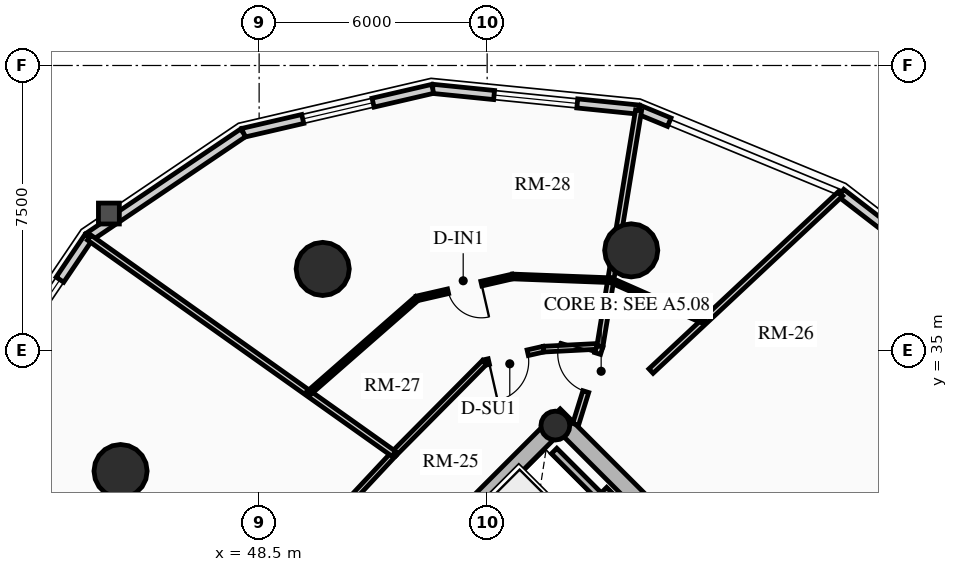
"""IFC4 building model, lengths in metres.
Left out: names, types, materials, properties, quantities, classifications, styles, units other than length and angle.
Written with IfcOpenShell. Run it as: python <this file> out.ifc"""

import sys

from ifc_helpers import new_model, si_unit, direction, frame, frame_2d, origin, origin_2d, place, context, subcontext, project, spatial, rectangle, circle, hollow_circle, extrude, source, transform, mapped, element, fill, save


model = new_model("IFC4")
c1 = context("Model", 3, precision=1e-05, world=origin(), true_north=direction((0.0, 1.0)))
c2 = subcontext(c1, "Body", "Model", "MODEL_VIEW")
j1 = project(units=[si_unit("LENGTHUNIT", "METRE"), si_unit("PLANEANGLEUNIT", "RADIAN")], contexts=[c1])
p1 = place(None, origin())
s1 = spatial("IfcSite", under=j1, at=p1, CompositionType="ELEMENT")
p2 = place(p1, origin())
s2 = spatial("IfcBuilding", under=s1, at=p2, CompositionType="ELEMENT")
p3 = place(p2, frame((0.0, 0.0, 107.98)))
s3 = spatial("IfcBuildingStorey", under=s2, at=p3, CompositionType="ELEMENT", Elevation=107.98)
p4 = place(p3, frame((66.303, 23.263, 0.0), z_axis=(0.0, 0.0, 1.0), x_axis=(-0.707106781187, 0.707106781187, 0.0)))
e1 = element("IfcWall", 1, at=p4, inside=s3, PredefinedType="SHEAR", context=c2, shape_type="SweptSolid", body=[
    extrude(rectangle(XDim=14.2, YDim=0.45, at=frame_2d((7.1, 0.0))), origin(), (0.0, 0.0, 1.0), 2.91),
])
p5 = place(p3, frame((48.856, 25.578, 0.0), z_axis=(0.0, 0.0, 1.0), x_axis=(0.707106781187, 0.707106781187, 0.0)))
e2 = element("IfcWall", 2, at=p5, inside=s3, PredefinedType="SHEAR", context=c2, shape_type="SweptSolid", body=[
    extrude(rectangle(XDim=10.7, YDim=0.45, at=frame_2d((5.35, 0.0))), origin(), (0.0, 0.0, 1.0), 2.91),
])
m1 = source(origin(), c2, "Body", "SweptSolid", [
    extrude(rectangle(XDim=1.5, YDim=2.02, at=frame_2d((0.75, 1.01))), frame((0.0, 0.235, 0.0), z_axis=(0.0, -1.0, 0.0), x_axis=(1.0, 0.0, 0.0)), (0.0, 0.0, 1.0), 0.47),
])
p6 = place(p5, frame((4.6, 0.0, 0.0)))
e3 = element("IfcOpeningElement", 3, at=p6, cuts=e2, PredefinedType="OPENING", context=c2, shape_type="MappedRepresentation", body=[
    mapped(m1, transform((0.0, 0.0, 0.0), x_axis=(1.0, 0.0, 0.0), y_axis=(0.0, 1.0, 0.0), z_axis=(0.0, 0.0, 1.0), scale=1.0)),
])
p7 = place(p3, frame((56.294, 33.024, 0.0), z_axis=(0.0, 0.0, 1.0), x_axis=(0.707106781187, 0.707106781187, 0.0)))
e4 = element("IfcColumn", 4, at=p7, inside=s3, PredefinedType="COLUMN", context=c2, shape_type="SweptSolid", body=[
    extrude(hollow_circle(Radius=0.38, WallThickness=0.032, at=origin_2d()), origin(), (0.0, 0.0, 1.0), 2.91),
])
for number, where, z_axis, x_axis in (
    (5, (58.291, 37.635, 0.0), (0.0, 0.0, 1.0), (1.0, 0.0, 0.0)),
    (6, (50.173, 37.146, 0.0), (0.0, 0.0, 1.0), (1.0, 0.0, 0.0)),
    (7, (44.854, 31.827, 0.0), (0.0, 0.0, 1.0), (1.0, 0.0, 0.0)),
):
    element("IfcColumn", number, at=place(p3, frame(where, z_axis=z_axis, x_axis=x_axis)), inside=s3, PredefinedType="USERDEFINED", context=c2, shape_type="SweptSolid", body=[
        extrude(circle(Radius=0.7, at=origin_2d()), origin(), (0.0, 0.0, 1.0), 2.91),
    ])
p8 = place(p3, frame((63.811, 39.145, 0.0), z_axis=(0.0, 0.0, 1.0), x_axis=(0.791982052206, -0.61054437102, 0.0)))
e8 = element("IfcWall", 8, at=p8, inside=s3, PredefinedType="SOLIDWALL", context=c2, shape_type="SweptSolid", body=[
    extrude(rectangle(XDim=5.942, YDim=0.24, at=frame_2d((2.971, 0.0))), origin(), (0.0, 0.0, 1.0), 2.179),
])
p9 = place(p3, frame((58.487, 41.339, 0.0), z_axis=(0.0, 0.0, 1.0), x_axis=(0.924556017656, -0.381046152345, 0.0)))
e9 = element("IfcWall", 9, at=p9, inside=s3, PredefinedType="SOLIDWALL", context=c2, shape_type="SweptSolid", body=[
    extrude(rectangle(XDim=0.87, YDim=0.24, at=frame_2d((0.435, 0.0))), origin(), (0.0, 0.0, 1.0), 2.179),
])
p10 = place(p3, frame((53.067, 41.885, 0.0), z_axis=(0.0, 0.0, 1.0), x_axis=(0.994971754311, -0.10015591906, 0.0)))
e10 = element("IfcWall", 10, at=p10, inside=s3, PredefinedType="SOLIDWALL", context=c2, shape_type="SweptSolid", body=[
    extrude(rectangle(XDim=5.448, YDim=0.24, at=frame_2d((2.724, 0.0))), origin(), (0.0, 0.0, 1.0), 2.179),
])
m2 = source(origin(), c2, "Body", "SweptSolid", [
    extrude(rectangle(XDim=2.2, YDim=1.35, at=frame_2d((1.1, 0.675))), frame((0.0, 0.13, 0.0), z_axis=(0.0, -1.0, 0.0), x_axis=(1.0, 0.0, 0.0)), (0.0, 0.0, 1.0), 0.26),
])
p11 = place(p10, frame((1.624, 0.0, 0.65)))
e11 = element("IfcOpeningElement", 11, at=p11, cuts=e10, PredefinedType="OPENING", context=c2, shape_type="MappedRepresentation", body=[
    mapped(m2, transform((0.0, 0.0, 0.0), x_axis=(1.0, 0.0, 0.0), y_axis=(0.0, 1.0, 0.0), z_axis=(0.0, 0.0, 1.0), scale=1.0)),
])
p12 = place(p3, frame((48.08, 40.729, 0.0), z_axis=(0.0, 0.0, 1.0), x_axis=(0.974165631126, 0.225834725257, 0.0)))
e12 = element("IfcWall", 12, at=p12, inside=s3, PredefinedType="SOLIDWALL", context=c2, shape_type="SweptSolid", body=[
    extrude(rectangle(XDim=5.119, YDim=0.24, at=frame_2d((2.56, 0.0))), origin(), (0.0, 0.0, 1.0), 2.179),
])
m3 = source(origin(), c2, "Body", "SweptSolid", [
    extrude(rectangle(XDim=1.9, YDim=1.35, at=frame_2d((0.95, 0.675))), frame((0.0, 0.13, 0.0), z_axis=(0.0, -1.0, 0.0), x_axis=(1.0, 0.0, 0.0)), (0.0, 0.0, 1.0), 0.26),
])
p13 = place(p12, frame((1.609, 0.0, 0.65)))
e13 = element("IfcOpeningElement", 13, at=p13, cuts=e12, PredefinedType="OPENING", context=c2, shape_type="MappedRepresentation", body=[
    mapped(m3, transform((0.0, 0.0, 0.0), x_axis=(1.0, 0.0, 0.0), y_axis=(0.0, 1.0, 0.0), z_axis=(0.0, 0.0, 1.0), scale=1.0)),
])
p14 = place(p3, frame((44.015, 37.985, 0.0), z_axis=(0.0, 0.0, 1.0), x_axis=(0.828781148131, 0.559572880421, 0.0)))
e14 = element("IfcWall", 14, at=p14, inside=s3, PredefinedType="SOLIDWALL", context=c2, shape_type="SweptSolid", body=[
    extrude(rectangle(XDim=4.905, YDim=0.24, at=frame_2d((2.452, 0.0))), origin(), (0.0, 0.0, 1.0), 2.179),
])
p15 = place(p3, frame((41.271, 33.92, 0.0), z_axis=(0.0, 0.0, 1.0), x_axis=(0.559572880421, 0.828781148131, 0.0)))
e15 = element("IfcWall", 15, at=p15, inside=s3, PredefinedType="SOLIDWALL", context=c2, shape_type="SweptSolid", body=[
    extrude(rectangle(XDim=4.905, YDim=0.24, at=frame_2d((2.452, 0.0))), origin(), (0.0, 0.0, 1.0), 2.179),
])
p16 = place(p15, frame((1.352, 0.0, 0.65)))
e16 = element("IfcOpeningElement", 16, at=p16, cuts=e15, PredefinedType="OPENING", context=c2, shape_type="MappedRepresentation", body=[
    mapped(m2, transform((0.0, 0.0, 0.0), x_axis=(1.0, 0.0, 0.0), y_axis=(0.0, 1.0, 0.0), z_axis=(0.0, 0.0, 1.0), scale=1.0)),
])
p17 = place(p3, frame((55.615, 29.227, 0.0), z_axis=(0.0, 0.0, 1.0), x_axis=(0.707147878904, 0.70706568108, 0.0)))
e17 = element("IfcWall", 17, at=p17, inside=s3, PredefinedType="SHEAR", context=c2, shape_type="SweptSolid", body=[
    extrude(rectangle(XDim=2.97, YDim=0.2, at=frame_2d((1.485, 0.0))), origin(), (0.0, 0.0, 1.0), 2.91),
])
p18 = place(p3, frame((57.419, 31.2, 0.0), z_axis=(0.0, 0.0, 1.0), x_axis=(-0.707032117043, 0.707181437447, 0.0)))
e18 = element("IfcWall", 18, at=p18, inside=s3, PredefinedType="SHEAR", context=c2, shape_type="SweptSolid", body=[
    extrude(rectangle(XDim=1.635, YDim=0.2, at=frame_2d((0.817, 0.0))), origin(), (0.0, 0.0, 1.0), 2.91),
])
p19 = place(p3, frame((57.467, 35.111, 0.0), z_axis=(0.0, 0.0, 1.0), x_axis=(-0.998691757323, -0.051134859488, 0.0)))
e19 = element("IfcWall", 19, at=p19, inside=s3, PredefinedType="PARTITIONING", context=c2, shape_type="SweptSolid", body=[
    extrude(rectangle(XDim=1.485, YDim=0.15, at=frame_2d((0.742, 0.0))), origin(), (0.0, 0.0, 1.0), 2.225),
])
p20 = place(p3, frame((55.984, 35.035, 0.0), z_axis=(0.0, 0.0, 1.0), x_axis=(-0.975290305708, -0.22092718165, 0.0)))
e20 = element("IfcWall", 20, at=p20, inside=s3, PredefinedType="PARTITIONING", context=c2, shape_type="SweptSolid", body=[
    extrude(rectangle(XDim=1.597, YDim=0.15, at=frame_2d((0.798, 0.0))), origin(), (0.0, 0.0, 1.0), 2.225),
])
m4 = source(origin(), c2, "Body", "SweptSolid", [
    extrude(rectangle(XDim=1.05, YDim=2.015, at=frame_2d((0.525, 1.007))), frame((0.0, 0.085, 0.0), z_axis=(0.0, -1.0, 0.0), x_axis=(1.0, 0.0, 0.0)), (0.0, 0.0, 1.0), 0.17),
])
p21 = place(p20, frame((0.427, 0.0, 0.0)))
e21 = element("IfcOpeningElement", 21, at=p21, cuts=e20, PredefinedType="OPENING", context=c2, shape_type="MappedRepresentation", body=[
    mapped(m4, transform((0.0, 0.0, 0.0), x_axis=(1.0, 0.0, 0.0), y_axis=(0.0, 1.0, 0.0), z_axis=(0.0, 0.0, 1.0), scale=1.0)),
])
p22 = place(p3, frame((54.427, 34.683, 0.0), z_axis=(0.0, 0.0, 1.0), x_axis=(-0.704178989986, -0.710022499687, 0.0)))
e22 = element("IfcWall", 22, at=p22, inside=s3, PredefinedType="PARTITIONING", context=c2, shape_type="SweptSolid", body=[
    extrude(rectangle(XDim=3.384, YDim=0.15, at=frame_2d((1.692, 0.0))), origin(), (0.0, 0.0, 1.0), 2.225),
])
p23 = place(p3, frame((52.043, 32.28, 0.0), z_axis=(0.0, 0.0, 1.0), x_axis=(-0.682606081633, -0.730786519661, 0.0)))
e23 = element("IfcWall", 23, at=p23, inside=s3, PredefinedType="PARTITIONING", context=c2, shape_type="SweptSolid", body=[
    extrude(rectangle(XDim=6.527, YDim=0.15, at=frame_2d((3.263, 0.0))), origin(), (0.0, 0.0, 1.0), 2.225),
])
p24 = place(p3, frame((58.812, 34.458, 0.0), z_axis=(0.0, 0.0, 1.0), x_axis=(0.73022196979, 0.683209978584, 0.0)))
e24 = element("IfcWall", 24, at=p24, inside=s3, PredefinedType="PARTITIONING", context=c2, shape_type="SweptSolid", body=[
    extrude(rectangle(XDim=6.834, YDim=0.16, at=frame_2d((3.417, 0.0))), origin(), (0.0, 0.0, 1.0), 2.179),
])
p25 = place(p3, frame((57.467, 35.111, 0.0), z_axis=(0.0, 0.0, 1.0), x_axis=(0.161711214096, 0.98683812413, 0.0)))
e25 = element("IfcWall", 25, at=p25, inside=s3, PredefinedType="PARTITIONING", context=c2, shape_type="SweptSolid", body=[
    extrude(rectangle(XDim=6.291, YDim=0.16, at=frame_2d((3.146, 0.0))), origin(), (0.0, 0.0, 1.0), 2.179),
])
p26 = place(p3, frame((52.043, 32.28, 0.0), z_axis=(0.0, 0.0, 1.0), x_axis=(-0.81534487613, 0.578975589268, 0.0)))
e26 = element("IfcWall", 26, at=p26, inside=s3, PredefinedType="PARTITIONING", context=c2, shape_type="SweptSolid", body=[
    extrude(rectangle(XDim=9.829, YDim=0.16, at=frame_2d((4.915, 0.0))), origin(), (0.0, 0.0, 1.0), 2.179),
])
p27 = place(p3, frame((56.828, 33.056, 0.0), z_axis=(0.0, 0.0, 1.0), x_axis=(0.296730996083, 0.954961107042, 0.0)))
e27 = element("IfcWall", 27, at=p27, inside=s3, PredefinedType="PARTITIONING", context=c2, shape_type="SweptSolid", body=[
    extrude(rectangle(XDim=2.152, YDim=0.16, at=frame_2d((1.076, 0.0))), origin(), (0.0, 0.0, 1.0), 2.225),
])
m5 = source(origin(), c2, "Body", "SweptSolid", [
    extrude(rectangle(XDim=1.05, YDim=2.015, at=frame_2d((0.525, 1.007))), frame((0.0, 0.09, 0.0), z_axis=(0.0, -1.0, 0.0), x_axis=(1.0, 0.0, 0.0)), (0.0, 0.0, 1.0), 0.18),
])
p28 = place(p27, frame((0.902, 0.0, 0.0)))
e28 = element("IfcOpeningElement", 28, at=p28, cuts=e27, PredefinedType="OPENING", context=c2, shape_type="MappedRepresentation", body=[
    mapped(m5, transform((0.0, 0.0, 0.0), x_axis=(1.0, 0.0, 0.0), y_axis=(0.0, 1.0, 0.0), z_axis=(0.0, 0.0, 1.0), scale=1.0)),
])
p29 = place(p3, frame((60.209, 35.766, 0.0), z_axis=(0.0, 0.0, 1.0), x_axis=(-0.914932611268, 0.403606636267, 0.0)))
e29 = element("IfcWall", 29, at=p29, inside=s3, PredefinedType="PARTITIONING", context=c2, shape_type="SweptSolid", body=[
    extrude(rectangle(XDim=2.686, YDim=0.125, at=frame_2d((1.343, 0.0))), origin(), (0.0, 0.0, 1.0), 2.225),
])
p30 = place(p3, frame((57.752, 36.85, 0.0), z_axis=(0.0, 0.0, 1.0), x_axis=(-0.999279468675, 0.037954492291, 0.0)))
e30 = element("IfcWall", 30, at=p30, inside=s3, PredefinedType="PARTITIONING", context=c2, shape_type="SweptSolid", body=[
    extrude(rectangle(XDim=2.586, YDim=0.125, at=frame_2d((1.293, 0.0))), origin(), (0.0, 0.0, 1.0), 2.292),
])
p31 = place(p3, frame((55.168, 36.948, 0.0), z_axis=(0.0, 0.0, 1.0), x_axis=(-0.974677367116, -0.223615808993, 0.0)))
e31 = element("IfcWall", 31, at=p31, inside=s3, PredefinedType="PARTITIONING", context=c2, shape_type="SweptSolid", body=[
    extrude(rectangle(XDim=2.581, YDim=0.125, at=frame_2d((1.291, 0.0))), origin(), (0.0, 0.0, 1.0), 2.225),
])
m6 = source(origin(), c2, "Body", "SweptSolid", [
    extrude(rectangle(XDim=0.9, YDim=2.005, at=frame_2d((0.45, 1.002))), frame((0.0, 0.073, 0.0), z_axis=(0.0, -1.0, 0.0), x_axis=(1.0, 0.0, 0.0)), (0.0, 0.0, 1.0), 0.145),
])
p32 = place(p31, frame((0.841, 0.0, 0.0)))
e32 = element("IfcOpeningElement", 32, at=p32, cuts=e31, PredefinedType="OPENING", context=c2, shape_type="MappedRepresentation", body=[
    mapped(m6, transform((0.0, 0.0, 0.0), x_axis=(1.0, 0.0, 0.0), y_axis=(0.0, 1.0, 0.0), z_axis=(0.0, 0.0, 1.0), scale=1.0)),
])
p33 = place(p3, frame((52.652, 36.371, 0.0), z_axis=(0.0, 0.0, 1.0), x_axis=(-0.752401146533, -0.658705180408, 0.0)))
e33 = element("IfcWall", 33, at=p33, inside=s3, PredefinedType="PARTITIONING", context=c2, shape_type="SweptSolid", body=[
    extrude(rectangle(XDim=3.791, YDim=0.125, at=frame_2d((1.896, 0.0))), origin(), (0.0, 0.0, 1.0), 2.225),
])
m7 = source(origin(), c2, "Body", "SweptSolid", [
    extrude(rectangle(XDim=2.2, YDim=1.35, at=frame_2d((1.1, 0.675))), frame((0.0, 0.03, 0.0), z_axis=(0.0, -1.0, 0.0), x_axis=(1.0, 0.0, 0.0)), (0.0, 0.0, 1.0), 0.06),
])
p34 = place(p11, origin())
e34 = element("IfcWindow", 34, at=p34, inside=s3, PartitioningType="DOUBLE_PANEL_VERTICAL", PredefinedType="WINDOW", context=c2, shape_type="MappedRepresentation", body=[
    mapped(m7, transform((0.0, 0.0, 0.0), x_axis=(1.0, 0.0, 0.0), y_axis=(0.0, 1.0, 0.0), z_axis=(0.0, 0.0, 1.0), scale=1.0)),
])
fill(e11, e34)
m8 = source(origin(), c2, "Body", "SweptSolid", [
    extrude(rectangle(XDim=1.9, YDim=1.35, at=frame_2d((0.95, 0.675))), frame((0.0, 0.03, 0.0), z_axis=(0.0, -1.0, 0.0), x_axis=(1.0, 0.0, 0.0)), (0.0, 0.0, 1.0), 0.06),
])
p35 = place(p13, origin())
e35 = element("IfcWindow", 35, at=p35, inside=s3, PartitioningType="DOUBLE_PANEL_VERTICAL", PredefinedType="WINDOW", context=c2, shape_type="MappedRepresentation", body=[
    mapped(m8, transform((0.0, 0.0, 0.0), x_axis=(1.0, 0.0, 0.0), y_axis=(0.0, 1.0, 0.0), z_axis=(0.0, 0.0, 1.0), scale=1.0)),
])
fill(e13, e35)
p36 = place(p16, origin())
e36 = element("IfcWindow", 36, at=p36, inside=s3, PartitioningType="DOUBLE_PANEL_VERTICAL", PredefinedType="WINDOW", context=c2, shape_type="MappedRepresentation", body=[
    mapped(m7, transform((0.0, 0.0, 0.0), x_axis=(1.0, 0.0, 0.0), y_axis=(0.0, 1.0, 0.0), z_axis=(0.0, 0.0, 1.0), scale=1.0)),
])
fill(e16, e36)
m9 = source(origin(), c2, "Body", "SweptSolid", [
    extrude(rectangle(XDim=1.05, YDim=2.015, at=frame_2d((0.525, 1.007))), frame((0.0, 0.025, 0.0), z_axis=(0.0, -1.0, 0.0), x_axis=(1.0, 0.0, 0.0)), (0.0, 0.0, 1.0), 0.05),
])
p37 = place(p28, origin())
e37 = element("IfcDoor", 37, at=p37, inside=s3, OperationType="SINGLE_SWING_RIGHT", PredefinedType="DOOR", context=c2, shape_type="MappedRepresentation", body=[
    mapped(m9, transform((0.0, 0.0, 0.0), x_axis=(1.0, 0.0, 0.0), y_axis=(0.0, 1.0, 0.0), z_axis=(0.0, 0.0, 1.0), scale=1.0)),
])
fill(e28, e37)
p38 = place(p21, origin())
e38 = element("IfcDoor", 38, at=p38, inside=s3, OperationType="SINGLE_SWING_RIGHT", PredefinedType="DOOR", context=c2, shape_type="MappedRepresentation", body=[
    mapped(m9, transform((0.0, 0.0, 0.0), x_axis=(1.0, 0.0, 0.0), y_axis=(0.0, 1.0, 0.0), z_axis=(0.0, 0.0, 1.0), scale=1.0)),
])
fill(e21, e38)
m10 = source(origin(), c2, "Body", "SweptSolid", [
    extrude(rectangle(XDim=0.9, YDim=2.005, at=frame_2d((0.45, 1.002))), frame((0.0, 0.025, 0.0), z_axis=(0.0, -1.0, 0.0), x_axis=(1.0, 0.0, 0.0)), (0.0, 0.0, 1.0), 0.05),
])
p39 = place(p32, origin())
e39 = element("IfcDoor", 39, at=p39, inside=s3, OperationType="SINGLE_SWING_LEFT", PredefinedType="DOOR", context=c2, shape_type="MappedRepresentation", body=[
    mapped(m10, transform((0.0, 0.0, 0.0), x_axis=(1.0, 0.0, 0.0), y_axis=(0.0, 1.0, 0.0), z_axis=(0.0, 0.0, 1.0), scale=1.0)),
])
fill(e32, e39)
save(model, sys.argv[1])
